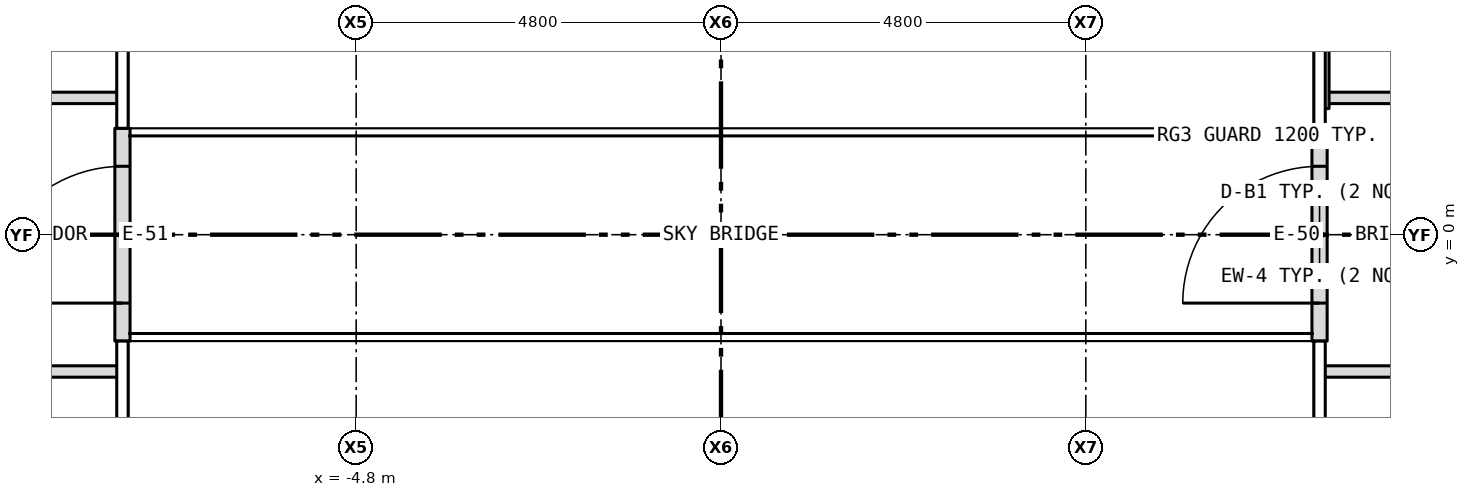
"""IFC4 building model, lengths in metres.
Left out: names, types, materials, properties, quantities, classifications, styles, units other than length and angle.
Written with IfcOpenShell. Run it as: python <this file> out.ifc"""

import sys

from ifc_helpers import new_model, si_unit, direction, frame, frame_2d, origin, place, context, subcontext, project, spatial, rectangle, extrude, element, fill, save


model = new_model("IFC4")
c1 = context("Model", 3, precision=1e-05, world=origin(), true_north=direction((0.0, 1.0)))
c2 = subcontext(c1, "Body", "Model", "MODEL_VIEW")
j1 = project(units=[si_unit("LENGTHUNIT", "METRE"), si_unit("PLANEANGLEUNIT", "RADIAN")], contexts=[c1])
p1 = place(None, origin())
s1 = spatial("IfcSite", under=j1, at=p1, CompositionType="ELEMENT")
p2 = place(p1, origin())
s2 = spatial("IfcBuilding", under=s1, at=p2, CompositionType="ELEMENT")
p3 = place(p2, frame((0.0, 0.0, 127.5)))
s3 = spatial("IfcBuildingStorey", under=s2, at=p3, CompositionType="ELEMENT", Elevation=127.5)
p4 = place(p3, frame((7.875, -1.4, 0.0), z_axis=(0.0, 0.0, 1.0), x_axis=(0.0, 1.0, 0.0)))
e1 = element("IfcWall", 1, at=p4, inside=s3, PredefinedType="SOLIDWALL", context=c2, shape_type="SweptSolid", body=[
    extrude(rectangle(XDim=2.8, YDim=0.2, at=frame_2d((1.4, 0.0))), origin(), (0.0, 0.0, 1.0), 3.5),
])
p5 = place(p4, frame((0.5, 0.0, 0.0)))
e2 = element("IfcOpeningElement", 2, at=p5, cuts=e1, PredefinedType="OPENING", context=c2, shape_type="SweptSolid", body=[
    extrude(rectangle(XDim=1.8, YDim=2.1, at=frame_2d((0.9, 1.05))), frame((0.0, 0.112, 0.0), z_axis=(0.0, -1.0, 0.0), x_axis=(1.0, 0.0, 0.0)), (0.0, 0.0, 1.0), 0.224),
])
p6 = place(p3, frame((-7.875, -1.4, 0.0), z_axis=(0.0, 0.0, 1.0), x_axis=(0.0, 1.0, 0.0)))
e3 = element("IfcWall", 3, at=p6, inside=s3, PredefinedType="SOLIDWALL", context=c2, shape_type="SweptSolid", body=[
    extrude(rectangle(XDim=2.8, YDim=0.2, at=frame_2d((1.4, 0.0))), origin(), (0.0, 0.0, 1.0), 3.5),
])
p7 = place(p6, frame((0.5, 0.0, 0.0)))
e4 = element("IfcOpeningElement", 4, at=p7, cuts=e3, PredefinedType="OPENING", context=c2, shape_type="SweptSolid", body=[
    extrude(rectangle(XDim=1.8, YDim=2.1, at=frame_2d((0.9, 1.05))), frame((0.0, 0.112, 0.0), z_axis=(0.0, -1.0, 0.0), x_axis=(1.0, 0.0, 0.0)), (0.0, 0.0, 1.0), 0.224),
])
for number, where, z_axis, x_axis in (
    (5, (-12.4, -1.8, 0.0), (0.0, 0.0, 1.0), (1.0, 0.0, 0.0)),
    (6, (7.92, -1.8, 0.0), (0.0, 0.0, 1.0), (1.0, 0.0, 0.0)),
    (7, (-12.4, 1.8, 0.0), (0.0, 0.0, 1.0), (1.0, 0.0, 0.0)),
):
    element("IfcWall", number, at=place(p3, frame(where, z_axis=z_axis, x_axis=x_axis)), inside=s3, PredefinedType="PARTITIONING", context=c2, shape_type="SweptSolid", body=[
        extrude(rectangle(XDim=4.48, YDim=0.15, at=frame_2d((2.24, 0.0))), origin(), (0.0, 0.0, 1.0), 3.35),
    ])
p8 = place(p3, frame((7.95, 1.8, 0.0), z_axis=(0.0, 0.0, 1.0), x_axis=(1.0, 0.0, 0.0)))
e8 = element("IfcWall", 8, at=p8, inside=s3, PredefinedType="PARTITIONING", context=c2, shape_type="SweptSolid", body=[
    extrude(rectangle(XDim=4.45, YDim=0.15, at=frame_2d((2.225, 0.0))), origin(), (0.0, 0.0, 1.0), 3.35),
])
p9 = place(p3, frame((7.95, 1.66, 0.0), z_axis=(0.0, 0.0, 1.0), x_axis=(0.0, 1.0, 0.0)))
e9 = element("IfcWall", 9, at=p9, inside=s3, PredefinedType="PARTITIONING", context=c2, shape_type="SweptSolid", body=[
    extrude(rectangle(XDim=4.38, YDim=0.1, at=frame_2d((2.19, 0.0))), origin(), (0.0, 0.0, 1.0), 2.733),
])
p10 = place(p5, origin())
e10 = element("IfcDoor", 10, at=p10, inside=s3, OperationType="DOUBLE_DOOR_DOUBLE_SWING", PredefinedType="DOOR", context=c2, shape_type="SweptSolid", body=[
    extrude(rectangle(XDim=1.8, YDim=2.1, at=frame_2d((0.9, 1.05))), frame((0.0, 0.025, 0.0), z_axis=(0.0, -1.0, 0.0), x_axis=(1.0, 0.0, 0.0)), (0.0, 0.0, 1.0), 0.05),
])
fill(e2, e10)
p11 = place(p7, origin())
e11 = element("IfcDoor", 11, at=p11, inside=s3, OperationType="DOUBLE_DOOR_DOUBLE_SWING", PredefinedType="DOOR", context=c2, shape_type="SweptSolid", body=[
    extrude(rectangle(XDim=1.8, YDim=2.1, at=frame_2d((0.9, 1.05))), frame((0.0, 0.025, 0.0), z_axis=(0.0, -1.0, 0.0), x_axis=(1.0, 0.0, 0.0)), (0.0, 0.0, 1.0), 0.05),
])
fill(e4, e11)
save(model, sys.argv[1])
